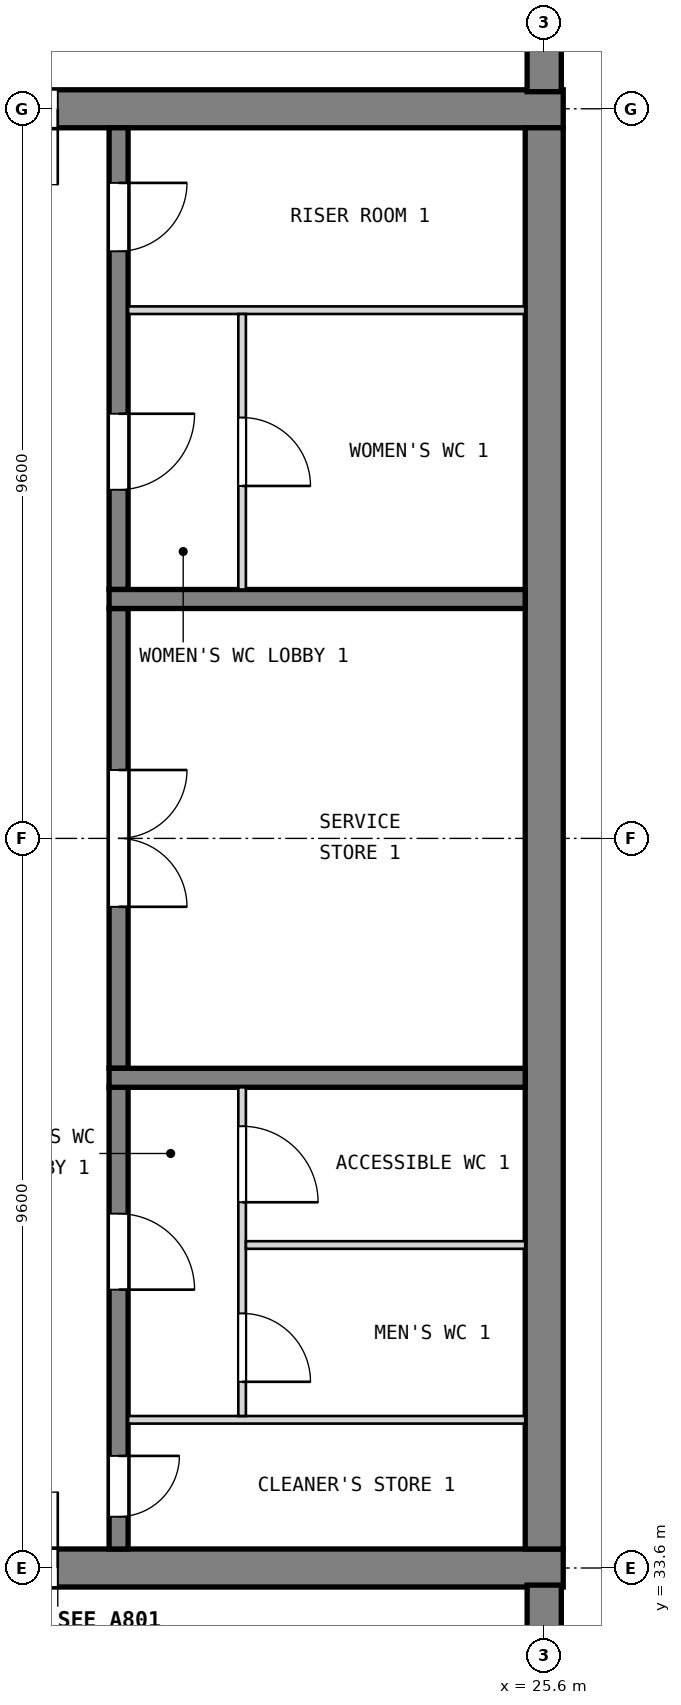
"""IFC4 building model, lengths in metres.
Left out: names, types, materials, properties, quantities, classifications, styles, units other than length and angle.
Written with IfcOpenShell. Run it as: python <this file> out.ifc"""

import sys

from ifc_helpers import new_model, si_unit, direction, frame, frame_2d, origin, place, context, subcontext, project, spatial, rectangle, extrude, element, fill, save


model = new_model("IFC4")
c1 = context("Model", 3, precision=1e-05, world=origin(), true_north=direction((0.0, 1.0)))
c2 = subcontext(c1, "Body", "Model", "MODEL_VIEW")
j1 = project(units=[si_unit("LENGTHUNIT", "METRE"), si_unit("PLANEANGLEUNIT", "RADIAN")], contexts=[c1])
p1 = place(None, origin())
s1 = spatial("IfcSite", under=j1, at=p1, CompositionType="ELEMENT")
p2 = place(p1, origin())
s2 = spatial("IfcBuilding", under=s1, at=p2, CompositionType="ELEMENT")
p3 = place(p2, frame((0.0, 0.0, -4.8)))
s3 = spatial("IfcBuildingStorey", under=s2, at=p3, CompositionType="ELEMENT", Elevation=-4.8)
p4 = place(p3, frame((12.55, 52.8, 0.0), z_axis=(0.0, 0.0, 1.0), x_axis=(1.0, 0.0, 0.0)))
e1 = element("IfcWall", 1, at=p4, inside=s3, PredefinedType="SHEAR", context=c2, shape_type="SweptSolid", body=[
    extrude(rectangle(XDim=13.3, YDim=0.5, at=frame_2d((6.65, 0.0))), origin(), (0.0, 0.0, 1.0), 4.8),
])
p5 = place(p4, frame((4.65, 0.0, 0.0)))
e2 = element("IfcOpeningElement", 2, at=p5, cuts=e1, PredefinedType="OPENING", context=c2, shape_type="SweptSolid", body=[
    extrude(rectangle(XDim=2.0, YDim=2.1, at=frame_2d((1.0, 1.05))), frame((0.0, 0.26, 0.0), z_axis=(0.0, -1.0, 0.0), x_axis=(1.0, 0.0, 0.0)), (0.0, 0.0, 1.0), 0.52),
])
p6 = place(p3, frame((12.55, 33.6, 0.0), z_axis=(0.0, 0.0, 1.0), x_axis=(1.0, 0.0, 0.0)))
e3 = element("IfcWall", 3, at=p6, inside=s3, PredefinedType="SHEAR", context=c2, shape_type="SweptSolid", body=[
    extrude(rectangle(XDim=13.3, YDim=0.5, at=frame_2d((6.65, 0.0))), origin(), (0.0, 0.0, 1.0), 4.8),
])
p7 = place(p6, frame((4.65, 0.0, 0.0)))
e4 = element("IfcOpeningElement", 4, at=p7, cuts=e3, PredefinedType="OPENING", context=c2, shape_type="SweptSolid", body=[
    extrude(rectangle(XDim=2.0, YDim=2.1, at=frame_2d((1.0, 1.05))), frame((0.0, 0.26, 0.0), z_axis=(0.0, -1.0, 0.0), x_axis=(1.0, 0.0, 0.0)), (0.0, 0.0, 1.0), 0.52),
])
p8 = place(p3, frame((25.6, 33.85, 0.0), z_axis=(0.0, 0.0, 1.0), x_axis=(0.0, 1.0, 0.0)))
e5 = element("IfcWall", 5, at=p8, inside=s3, PredefinedType="SHEAR", context=c2, shape_type="SweptSolid", body=[
    extrude(rectangle(XDim=18.7, YDim=0.5, at=frame_2d((9.35, 0.0))), origin(), (0.0, 0.0, 1.0), 4.8),
])
p9 = place(p3, frame((25.6, -0.225, 0.0), z_axis=(0.0, 0.0, 1.0), x_axis=(0.0, 1.0, 0.0)))
e6 = element("IfcWall", 6, at=p9, inside=s3, PredefinedType="SOLIDWALL", context=c2, shape_type="SweptSolid", body=[
    extrude(rectangle(XDim=33.6, YDim=0.45, at=frame_2d((16.8, 0.0))), origin(), (0.0, 0.0, 1.0), 4.8),
])
p10 = place(p3, frame((25.6, 53.025, 0.0), z_axis=(0.0, 0.0, 1.0), x_axis=(0.0, 1.0, 0.0)))
e7 = element("IfcWall", 7, at=p10, inside=s3, PredefinedType="SOLIDWALL", context=c2, shape_type="SweptSolid", body=[
    extrude(rectangle(XDim=4.8, YDim=0.45, at=frame_2d((2.4, 0.0))), origin(), (0.0, 0.0, 1.0), 4.8),
])
p11 = place(p3, frame((20.0, 33.85, 0.0), z_axis=(0.0, 0.0, 1.0), x_axis=(0.0, 1.0, 0.0)))
e8 = element("IfcWall", 8, at=p11, inside=s3, PredefinedType="SOLIDWALL", context=c2, shape_type="SweptSolid", body=[
    extrude(rectangle(XDim=6.075, YDim=0.25, at=frame_2d((3.038, 0.0))), origin(), (0.0, 0.0, 1.0), 4.5),
])
p12 = place(p11, frame((0.425, 0.0, 0.0)))
e9 = element("IfcOpeningElement", 9, at=p12, cuts=e8, PredefinedType="OPENING", context=c2, shape_type="SweptSolid", body=[
    extrude(rectangle(XDim=0.8, YDim=2.1, at=frame_2d((0.4, 1.05))), frame((0.0, 0.135, 0.0), z_axis=(0.0, -1.0, 0.0), x_axis=(1.0, 0.0, 0.0)), (0.0, 0.0, 1.0), 0.27),
])
p13 = place(p11, frame((3.413, 0.0, 0.0)))
e10 = element("IfcOpeningElement", 10, at=p13, cuts=e8, PredefinedType="OPENING", context=c2, shape_type="SweptSolid", body=[
    extrude(rectangle(XDim=1.0, YDim=2.1, at=frame_2d((0.5, 1.05))), frame((0.0, 0.135, 0.0), z_axis=(0.0, -1.0, 0.0), x_axis=(1.0, 0.0, 0.0)), (0.0, 0.0, 1.0), 0.27),
])
p14 = place(p3, frame((20.0, 40.175, 0.0), z_axis=(0.0, 0.0, 1.0), x_axis=(0.0, 1.0, 0.0)))
e11 = element("IfcWall", 11, at=p14, inside=s3, PredefinedType="SOLIDWALL", context=c2, shape_type="SweptSolid", body=[
    extrude(rectangle(XDim=6.05, YDim=0.25, at=frame_2d((3.025, 0.0))), origin(), (0.0, 0.0, 1.0), 4.5),
])
p15 = place(p14, frame((2.125, 0.0, 0.0)))
e12 = element("IfcOpeningElement", 12, at=p15, cuts=e11, PredefinedType="OPENING", context=c2, shape_type="SweptSolid", body=[
    extrude(rectangle(XDim=1.8, YDim=2.1, at=frame_2d((0.9, 1.05))), frame((0.0, 0.135, 0.0), z_axis=(0.0, -1.0, 0.0), x_axis=(1.0, 0.0, 0.0)), (0.0, 0.0, 1.0), 0.27),
])
p16 = place(p3, frame((20.0, 46.475, 0.0), z_axis=(0.0, 0.0, 1.0), x_axis=(0.0, 1.0, 0.0)))
e13 = element("IfcWall", 13, at=p16, inside=s3, PredefinedType="SOLIDWALL", context=c2, shape_type="SweptSolid", body=[
    extrude(rectangle(XDim=6.075, YDim=0.25, at=frame_2d((3.038, 0.0))), origin(), (0.0, 0.0, 1.0), 4.5),
])
p17 = place(p16, frame((1.312, 0.0, 0.0)))
e14 = element("IfcOpeningElement", 14, at=p17, cuts=e13, PredefinedType="OPENING", context=c2, shape_type="SweptSolid", body=[
    extrude(rectangle(XDim=1.0, YDim=2.1, at=frame_2d((0.5, 1.05))), frame((0.0, 0.135, 0.0), z_axis=(0.0, -1.0, 0.0), x_axis=(1.0, 0.0, 0.0)), (0.0, 0.0, 1.0), 0.27),
])
p18 = place(p16, frame((4.45, 0.0, 0.0)))
e15 = element("IfcOpeningElement", 15, at=p18, cuts=e13, PredefinedType="OPENING", context=c2, shape_type="SweptSolid", body=[
    extrude(rectangle(XDim=0.9, YDim=2.1, at=frame_2d((0.45, 1.05))), frame((0.0, 0.135, 0.0), z_axis=(0.0, -1.0, 0.0), x_axis=(1.0, 0.0, 0.0)), (0.0, 0.0, 1.0), 0.27),
])
for number, where, z_axis, x_axis in (
    (16, (19.875, 40.05, 0.0), (0.0, 0.0, 1.0), (1.0, 0.0, 0.0)),
    (17, (19.875, 46.35, 0.0), (0.0, 0.0, 1.0), (1.0, 0.0, 0.0)),
):
    element("IfcWall", number, at=place(p3, frame(where, z_axis=z_axis, x_axis=x_axis)), inside=s3, PredefinedType="SOLIDWALL", context=c2, shape_type="SweptSolid", body=[
        extrude(rectangle(XDim=5.475, YDim=0.25, at=frame_2d((2.738, 0.0))), origin(), (0.0, 0.0, 1.0), 4.5),
    ])
p19 = place(p3, frame((20.125, 35.55, 0.0), z_axis=(0.0, 0.0, 1.0), x_axis=(1.0, 0.0, 0.0)))
e18 = element("IfcWall", 18, at=p19, inside=s3, PredefinedType="PARTITIONING", context=c2, shape_type="SweptSolid", body=[
    extrude(rectangle(XDim=5.225, YDim=0.1, at=frame_2d((2.613, 0.0))), origin(), (0.0, 0.0, 1.0), 4.5),
])
p20 = place(p3, frame((21.625, 35.6, 0.0), z_axis=(0.0, 0.0, 1.0), x_axis=(0.0, 1.0, 0.0)))
e19 = element("IfcWall", 19, at=p20, inside=s3, PredefinedType="PARTITIONING", context=c2, shape_type="SweptSolid", body=[
    extrude(rectangle(XDim=4.325, YDim=0.1, at=frame_2d((2.163, 0.0))), origin(), (0.0, 0.0, 1.0), 4.5),
])
p21 = place(p20, frame((0.45, 0.0, 0.0)))
e20 = element("IfcOpeningElement", 20, at=p21, cuts=e19, PredefinedType="OPENING", context=c2, shape_type="SweptSolid", body=[
    extrude(rectangle(XDim=0.9, YDim=2.1, at=frame_2d((0.45, 1.05))), frame((0.0, 0.06, 0.0), z_axis=(0.0, -1.0, 0.0), x_axis=(1.0, 0.0, 0.0)), (0.0, 0.0, 1.0), 0.12),
])
p22 = place(p20, frame((2.812, 0.0, 0.0)))
e21 = element("IfcOpeningElement", 21, at=p22, cuts=e19, PredefinedType="OPENING", context=c2, shape_type="SweptSolid", body=[
    extrude(rectangle(XDim=1.0, YDim=2.1, at=frame_2d((0.5, 1.05))), frame((0.0, 0.06, 0.0), z_axis=(0.0, -1.0, 0.0), x_axis=(1.0, 0.0, 0.0)), (0.0, 0.0, 1.0), 0.12),
])
p23 = place(p3, frame((21.675, 37.85, 0.0), z_axis=(0.0, 0.0, 1.0), x_axis=(1.0, 0.0, 0.0)))
e22 = element("IfcWall", 22, at=p23, inside=s3, PredefinedType="PARTITIONING", context=c2, shape_type="SweptSolid", body=[
    extrude(rectangle(XDim=3.675, YDim=0.1, at=frame_2d((1.837, 0.0))), origin(), (0.0, 0.0, 1.0), 4.5),
])
p24 = place(p3, frame((20.125, 50.15, 0.0), z_axis=(0.0, 0.0, 1.0), x_axis=(1.0, 0.0, 0.0)))
e23 = element("IfcWall", 23, at=p24, inside=s3, PredefinedType="PARTITIONING", context=c2, shape_type="SweptSolid", body=[
    extrude(rectangle(XDim=5.225, YDim=0.1, at=frame_2d((2.613, 0.0))), origin(), (0.0, 0.0, 1.0), 4.5),
])
p25 = place(p3, frame((21.625, 46.475, 0.0), z_axis=(0.0, 0.0, 1.0), x_axis=(0.0, 1.0, 0.0)))
e24 = element("IfcWall", 24, at=p25, inside=s3, PredefinedType="PARTITIONING", context=c2, shape_type="SweptSolid", body=[
    extrude(rectangle(XDim=3.625, YDim=0.1, at=frame_2d((1.812, 0.0))), origin(), (0.0, 0.0, 1.0), 4.5),
])
p26 = place(p25, frame((1.363, 0.0, 0.0)))
e25 = element("IfcOpeningElement", 25, at=p26, cuts=e24, PredefinedType="OPENING", context=c2, shape_type="SweptSolid", body=[
    extrude(rectangle(XDim=0.9, YDim=2.1, at=frame_2d((0.45, 1.05))), frame((0.0, 0.06, 0.0), z_axis=(0.0, -1.0, 0.0), x_axis=(1.0, 0.0, 0.0)), (0.0, 0.0, 1.0), 0.12),
])
p27 = place(p15, frame((1.8, 0.0, 0.0), z_axis=(0.0, 0.0, 1.0), x_axis=(-1.0, 0.0, 0.0)))
e26 = element("IfcDoor", 26, at=p27, inside=s3, OperationType="DOUBLE_DOOR_SINGLE_SWING", PredefinedType="DOOR", context=c2, shape_type="SweptSolid", body=[
    extrude(rectangle(XDim=1.8, YDim=2.1, at=frame_2d((0.9, 1.05))), frame((0.0, 0.025, 0.0), z_axis=(0.0, -1.0, 0.0), x_axis=(1.0, 0.0, 0.0)), (0.0, 0.0, 1.0), 0.05),
])
fill(e12, e26)
p28 = place(p12, frame((0.8, 0.0, 0.0), z_axis=(0.0, 0.0, 1.0), x_axis=(-1.0, 0.0, 0.0)))
e27 = element("IfcDoor", 27, at=p28, inside=s3, OperationType="SINGLE_SWING_LEFT", PredefinedType="DOOR", context=c2, shape_type="SweptSolid", body=[
    extrude(rectangle(XDim=0.8, YDim=2.1, at=frame_2d((0.4, 1.05))), frame((0.0, 0.025, 0.0), z_axis=(0.0, -1.0, 0.0), x_axis=(1.0, 0.0, 0.0)), (0.0, 0.0, 1.0), 0.05),
])
fill(e9, e27)
p29 = place(p13, frame((1.0, 0.0, 0.0), z_axis=(0.0, 0.0, 1.0), x_axis=(-1.0, 0.0, 0.0)))
e28 = element("IfcDoor", 28, at=p29, inside=s3, OperationType="SINGLE_SWING_RIGHT", PredefinedType="DOOR", context=c2, shape_type="SweptSolid", body=[
    extrude(rectangle(XDim=1.0, YDim=2.1, at=frame_2d((0.5, 1.05))), frame((0.0, 0.025, 0.0), z_axis=(0.0, -1.0, 0.0), x_axis=(1.0, 0.0, 0.0)), (0.0, 0.0, 1.0), 0.05),
])
fill(e10, e28)
p30 = place(p21, frame((0.9, 0.0, 0.0), z_axis=(0.0, 0.0, 1.0), x_axis=(-1.0, 0.0, 0.0)))
e29 = element("IfcDoor", 29, at=p30, inside=s3, OperationType="SINGLE_SWING_RIGHT", PredefinedType="DOOR", context=c2, shape_type="SweptSolid", body=[
    extrude(rectangle(XDim=0.9, YDim=2.1, at=frame_2d((0.45, 1.05))), frame((0.0, 0.025, 0.0), z_axis=(0.0, -1.0, 0.0), x_axis=(1.0, 0.0, 0.0)), (0.0, 0.0, 1.0), 0.05),
])
fill(e20, e29)
p31 = place(p22, frame((1.0, 0.0, 0.0), z_axis=(0.0, 0.0, 1.0), x_axis=(-1.0, 0.0, 0.0)))
e30 = element("IfcDoor", 30, at=p31, inside=s3, OperationType="SINGLE_SWING_RIGHT", PredefinedType="DOOR", context=c2, shape_type="SweptSolid", body=[
    extrude(rectangle(XDim=1.0, YDim=2.1, at=frame_2d((0.5, 1.05))), frame((0.0, 0.025, 0.0), z_axis=(0.0, -1.0, 0.0), x_axis=(1.0, 0.0, 0.0)), (0.0, 0.0, 1.0), 0.05),
])
fill(e21, e30)
p32 = place(p17, frame((1.0, 0.0, 0.0), z_axis=(0.0, 0.0, 1.0), x_axis=(-1.0, 0.0, 0.0)))
e31 = element("IfcDoor", 31, at=p32, inside=s3, OperationType="SINGLE_SWING_LEFT", PredefinedType="DOOR", context=c2, shape_type="SweptSolid", body=[
    extrude(rectangle(XDim=1.0, YDim=2.1, at=frame_2d((0.5, 1.05))), frame((0.0, 0.025, 0.0), z_axis=(0.0, -1.0, 0.0), x_axis=(1.0, 0.0, 0.0)), (0.0, 0.0, 1.0), 0.05),
])
fill(e14, e31)
p33 = place(p26, frame((0.9, 0.0, 0.0), z_axis=(0.0, 0.0, 1.0), x_axis=(-1.0, 0.0, 0.0)))
e32 = element("IfcDoor", 32, at=p33, inside=s3, OperationType="SINGLE_SWING_RIGHT", PredefinedType="DOOR", context=c2, shape_type="SweptSolid", body=[
    extrude(rectangle(XDim=0.9, YDim=2.1, at=frame_2d((0.45, 1.05))), frame((0.0, 0.025, 0.0), z_axis=(0.0, -1.0, 0.0), x_axis=(1.0, 0.0, 0.0)), (0.0, 0.0, 1.0), 0.05),
])
fill(e25, e32)
p34 = place(p18, frame((0.9, 0.0, 0.0), z_axis=(0.0, 0.0, 1.0), x_axis=(-1.0, 0.0, 0.0)))
e33 = element("IfcDoor", 33, at=p34, inside=s3, OperationType="SINGLE_SWING_LEFT", PredefinedType="DOOR", context=c2, shape_type="SweptSolid", body=[
    extrude(rectangle(XDim=0.9, YDim=2.1, at=frame_2d((0.45, 1.05))), frame((0.0, 0.025, 0.0), z_axis=(0.0, -1.0, 0.0), x_axis=(1.0, 0.0, 0.0)), (0.0, 0.0, 1.0), 0.05),
])
fill(e15, e33)
p35 = place(p7, origin())
e34 = element("IfcDoor", 34, at=p35, inside=s3, OperationType="DOUBLE_DOOR_SINGLE_SWING", PredefinedType="DOOR", context=c2, shape_type="SweptSolid", body=[
    extrude(rectangle(XDim=2.0, YDim=2.1, at=frame_2d((1.0, 1.05))), frame((0.0, 0.025, 0.0), z_axis=(0.0, -1.0, 0.0), x_axis=(1.0, 0.0, 0.0)), (0.0, 0.0, 1.0), 0.05),
])
fill(e4, e34)
p36 = place(p5, frame((2.0, 0.0, 0.0), z_axis=(0.0, 0.0, 1.0), x_axis=(-1.0, 0.0, 0.0)))
e35 = element("IfcDoor", 35, at=p36, inside=s3, OperationType="DOUBLE_DOOR_SINGLE_SWING", PredefinedType="DOOR", context=c2, shape_type="SweptSolid", body=[
    extrude(rectangle(XDim=2.0, YDim=2.1, at=frame_2d((1.0, 1.05))), frame((0.0, 0.025, 0.0), z_axis=(0.0, -1.0, 0.0), x_axis=(1.0, 0.0, 0.0)), (0.0, 0.0, 1.0), 0.05),
])
fill(e2, e35)
save(model, sys.argv[1])
